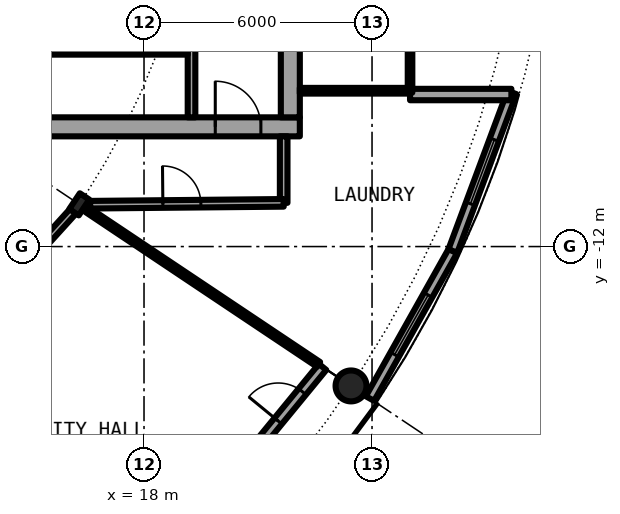
"""IFC4 building model, lengths in metres.
Left out: names, types, materials, properties, quantities, classifications, styles, units other than length and angle.
Written with IfcOpenShell. Run it as: python <this file> out.ifc"""

import sys

from ifc_helpers import new_model, si_unit, direction, frame, frame_2d, origin, origin_2d, place, context, subcontext, project, spatial, rectangle, hollow_circle, i_section, extrude, element, fill, save


model = new_model("IFC4")
c1 = context("Model", 3, precision=1e-05, world=origin(), true_north=direction((0.0, 1.0)))
c2 = subcontext(c1, "Body", "Model", "MODEL_VIEW")
j1 = project(units=[si_unit("LENGTHUNIT", "METRE"), si_unit("PLANEANGLEUNIT", "RADIAN")], contexts=[c1])
p1 = place(None, origin())
s1 = spatial("IfcSite", under=j1, at=p1, CompositionType="ELEMENT")
p2 = place(p1, origin())
s2 = spatial("IfcBuilding", under=s1, at=p2, CompositionType="ELEMENT")
p3 = place(p2, frame((0.0, 0.0, 157.4)))
s3 = spatial("IfcBuildingStorey", under=s2, at=p3, CompositionType="ELEMENT", Elevation=157.4)
p4 = place(p3, frame((23.448, -15.667, 0.0), z_axis=(0.0, 0.0, 1.0), x_axis=(1.0, 0.0, 0.0)))
e1 = element("IfcColumn", 1, at=p4, inside=s3, PredefinedType="COLUMN", context=c2, shape_type="SweptSolid", body=[
    extrude(hollow_circle(Radius=0.406, WallThickness=0.04, at=origin_2d()), origin(), (0.0, 0.0, 1.0), 4.2),
])
p5 = place(p3, frame((16.297, -10.889, 0.0), z_axis=(0.0, 0.0, 1.0), x_axis=(0.831469612303, -0.55557023302, 0.0)))
e2 = element("IfcColumn", 2, at=p5, inside=s3, PredefinedType="COLUMN", context=c2, shape_type="SweptSolid", body=[
    extrude(i_section(OverallWidth=0.3, OverallDepth=0.5, WebThickness=0.014, FlangeThickness=0.028, FilletRadius=0.027, at=origin_2d()), origin(), (0.0, 0.0, 1.0), 4.2),
])
p6 = place(p3, frame((19.304, -19.304, 0.0), z_axis=(0.0, 0.0, 1.0), x_axis=(0.634382322723, 0.773019449054, 0.0)))
e3 = element("IfcWall", 3, at=p6, inside=s3, PredefinedType="SOLIDWALL", context=c2, shape_type="SweptSolid", body=[
    extrude(rectangle(XDim=5.352, YDim=0.25, at=frame_2d((2.676, 0.0))), origin(), (0.0, 0.0, 1.0), 3.85),
])
p7 = place(p6, frame((0.841, 0.0, 0.0)))
e4 = element("IfcOpeningElement", 4, at=p7, cuts=e3, PredefinedType="OPENING", context=c2, shape_type="SweptSolid", body=[
    extrude(rectangle(XDim=1.0, YDim=2.2, at=frame_2d((0.5, 1.1))), frame((0.0, 0.135, 0.0), z_axis=(0.0, -1.0, 0.0), x_axis=(1.0, 0.0, 0.0)), (0.0, 0.0, 1.0), 0.27),
])
p8 = place(p6, frame((3.51, 0.0, 0.0)))
e5 = element("IfcOpeningElement", 5, at=p8, cuts=e3, PredefinedType="OPENING", context=c2, shape_type="SweptSolid", body=[
    extrude(rectangle(XDim=1.0, YDim=2.2, at=frame_2d((0.5, 1.1))), frame((0.0, 0.135, 0.0), z_axis=(0.0, -1.0, 0.0), x_axis=(1.0, 0.0, 0.0)), (0.0, 0.0, 1.0), 0.27),
])
p9 = place(p3, frame((23.946, -16.0, 0.0), z_axis=(0.0, 0.0, 1.0), x_axis=(0.489696356642, 0.871893042919, 0.0)))
e6 = element("IfcWall", 6, at=p9, inside=s3, PredefinedType="SOLIDWALL", context=c2, shape_type="SweptSolid", body=[
    extrude(rectangle(XDim=4.454, YDim=0.25, at=frame_2d((2.227, 0.0))), origin(), (0.0, 0.0, 1.0), 3.85),
])
p10 = place(p9, frame((1.327, 0.0, 0.3)))
e7 = element("IfcOpeningElement", 7, at=p10, cuts=e6, PredefinedType="OPENING", context=c2, shape_type="SweptSolid", body=[
    extrude(rectangle(XDim=1.8, YDim=2.1, at=frame_2d((0.9, 1.05))), frame((0.0, 0.135, 0.0), z_axis=(0.0, -1.0, 0.0), x_axis=(1.0, 0.0, 0.0)), (0.0, 0.0, 1.0), 0.27),
])
p11 = place(p3, frame((26.127, -12.117, 0.0), z_axis=(0.0, 0.0, 1.0), x_axis=(0.349247811493, 0.937030397675, 0.0)))
e8 = element("IfcWall", 8, at=p11, inside=s3, PredefinedType="SOLIDWALL", context=c2, shape_type="SweptSolid", body=[
    extrude(rectangle(XDim=4.452, YDim=0.25, at=frame_2d((2.226, 0.0))), origin(), (0.0, 0.0, 1.0), 3.85),
])
p12 = place(p11, frame((1.327, 0.0, 0.3)))
e9 = element("IfcOpeningElement", 9, at=p12, cuts=e8, PredefinedType="OPENING", context=c2, shape_type="SweptSolid", body=[
    extrude(rectangle(XDim=1.8, YDim=2.1, at=frame_2d((0.9, 1.05))), frame((0.0, 0.135, 0.0), z_axis=(0.0, -1.0, 0.0), x_axis=(1.0, 0.0, 0.0)), (0.0, 0.0, 1.0), 0.27),
])
p13 = place(p3, frame((25.0, -8.0, 0.0), z_axis=(0.0, 0.0, 1.0), x_axis=(1.0, 0.0, 0.0)))
e10 = element("IfcWall", 10, at=p13, inside=s3, PredefinedType="SOLIDWALL", context=c2, shape_type="SweptSolid", body=[
    extrude(rectangle(XDim=2.667, YDim=0.3, at=frame_2d((1.333, 0.0))), origin(), (0.0, 0.0, 1.0), 3.85),
])
p14 = place(p3, frame((8.5, -8.85, 0.0), z_axis=(0.0, 0.0, 1.0), x_axis=(1.0, 0.0, 0.0)))
e11 = element("IfcWall", 11, at=p14, inside=s3, PredefinedType="SHEAR", context=c2, shape_type="SweptSolid", body=[
    extrude(rectangle(XDim=13.6, YDim=0.5, at=frame_2d((6.8, 0.0))), origin(), (0.0, 0.0, 1.0), 4.2),
])
p15 = place(p14, frame((11.375, 0.0, 0.0)))
e12 = element("IfcOpeningElement", 12, at=p15, cuts=e11, PredefinedType="OPENING", context=c2, shape_type="SweptSolid", body=[
    extrude(rectangle(XDim=1.2, YDim=2.3, at=frame_2d((0.6, 1.15))), frame((0.0, 0.26, 0.0), z_axis=(0.0, -1.0, 0.0), x_axis=(1.0, 0.0, 0.0)), (0.0, 0.0, 1.0), 0.52),
])
p16 = place(p3, frame((21.85, 8.6, 0.0), z_axis=(0.0, 0.0, 1.0), x_axis=(0.0, -1.0, 0.0)))
e13 = element("IfcWall", 13, at=p16, inside=s3, PredefinedType="SHEAR", context=c2, shape_type="SweptSolid", body=[
    extrude(rectangle(XDim=17.2, YDim=0.5, at=frame_2d((8.6, 0.0))), origin(), (0.0, 0.0, 1.0), 4.2),
])
p17 = place(p16, frame((7.7, 0.0, 0.0)))
e14 = element("IfcOpeningElement", 14, at=p17, cuts=e13, PredefinedType="OPENING", context=c2, shape_type="SweptSolid", body=[
    extrude(rectangle(XDim=1.8, YDim=2.3, at=frame_2d((0.9, 1.15))), frame((0.0, 0.26, 0.0), z_axis=(0.0, -1.0, 0.0), x_axis=(1.0, 0.0, 0.0)), (0.0, 0.0, 1.0), 0.52),
])
p18 = place(p3, frame((19.25, -8.6, 0.0), z_axis=(0.0, 0.0, 1.0), x_axis=(0.0, 1.0, 0.0)))
e15 = element("IfcWall", 15, at=p18, inside=s3, PredefinedType="SOLIDWALL", context=c2, shape_type="SweptSolid", body=[
    extrude(rectangle(XDim=7.025, YDim=0.2, at=frame_2d((3.513, 0.0))), origin(), (0.0, 0.0, 1.0), 3.85),
])
p19 = place(p18, frame((2.35, 0.0, 0.0)))
e16 = element("IfcOpeningElement", 16, at=p19, cuts=e15, PredefinedType="OPENING", context=c2, shape_type="SweptSolid", body=[
    extrude(rectangle(XDim=1.1, YDim=2.3, at=frame_2d((0.55, 1.15))), frame((0.0, 0.11, 0.0), z_axis=(0.0, -1.0, 0.0), x_axis=(1.0, 0.0, 0.0)), (0.0, 0.0, 1.0), 0.22),
])
p20 = place(p3, frame((15.45, -6.875, 0.0), z_axis=(0.0, 0.0, 1.0), x_axis=(1.0, 0.0, 0.0)))
e17 = element("IfcWall", 17, at=p20, inside=s3, PredefinedType="PARTITIONING", context=c2, shape_type="SweptSolid", body=[
    extrude(rectangle(XDim=3.7, YDim=0.15, at=frame_2d((1.85, 0.0))), origin(), (0.0, 0.0, 1.0), 3.85),
])
p21 = place(p20, frame((1.4, 0.0, 0.0)))
e18 = element("IfcOpeningElement", 18, at=p21, cuts=e17, PredefinedType="OPENING", context=c2, shape_type="SweptSolid", body=[
    extrude(rectangle(XDim=0.9, YDim=2.3, at=frame_2d((0.45, 1.15))), frame((0.0, 0.085, 0.0), z_axis=(0.0, -1.0, 0.0), x_axis=(1.0, 0.0, 0.0)), (0.0, 0.0, 1.0), 0.17),
])
p22 = place(p3, frame((22.1, -7.9, 0.0), z_axis=(0.0, 0.0, 1.0), x_axis=(1.0, 0.0, 0.0)))
e19 = element("IfcWall", 19, at=p22, inside=s3, PredefinedType="PARTITIONING", context=c2, shape_type="SweptSolid", body=[
    extrude(rectangle(XDim=2.84, YDim=0.15, at=frame_2d((1.42, 0.0))), origin(), (0.0, 0.0, 1.0), 3.85),
])
p23 = place(p3, frame((25.0, -7.95, 0.0), z_axis=(0.0, 0.0, 1.0), x_axis=(0.0, 1.0, 0.0)))
e20 = element("IfcWall", 20, at=p23, inside=s3, PredefinedType="PARTITIONING", context=c2, shape_type="SweptSolid", body=[
    extrude(rectangle(XDim=15.9, YDim=0.12, at=frame_2d((7.95, 0.0))), origin(), (0.0, 0.0, 1.0), 3.85),
])
p24 = place(p23, frame((0.95, 0.0, 0.1)))
e21 = element("IfcOpeningElement", 21, at=p24, cuts=e20, PredefinedType="OPENING", context=c2, shape_type="SweptSolid", body=[
    extrude(rectangle(XDim=14.0, YDim=3.5, at=frame_2d((7.0, 1.75))), frame((0.0, 0.07, 0.0), z_axis=(0.0, -1.0, 0.0), x_axis=(1.0, 0.0, 0.0)), (0.0, 0.0, 1.0), 0.14),
])
p25 = place(p3, frame((21.675, -10.85, 0.0), z_axis=(0.0, 0.0, 1.0), x_axis=(0.0, 1.0, 0.0)))
e22 = element("IfcWall", 22, at=p25, inside=s3, PredefinedType="PARTITIONING", context=c2, shape_type="SweptSolid", body=[
    extrude(rectangle(XDim=1.75, YDim=0.2, at=frame_2d((0.875, 0.0))), origin(), (0.0, 0.0, 1.0), 3.85),
])
p26 = place(p3, frame((12.434, -15.151, 0.0), z_axis=(0.0, 0.0, 1.0), x_axis=(0.671532887857, 0.740974750262, 0.0)))
e23 = element("IfcWall", 23, at=p26, inside=s3, PredefinedType="PARTITIONING", context=c2, shape_type="SweptSolid", body=[
    extrude(rectangle(XDim=5.601, YDim=0.2, at=frame_2d((2.8, 0.0))), origin(), (0.0, 0.0, 1.0), 3.54),
])
p27 = place(p3, frame((16.582, -10.899, 0.0), z_axis=(0.0, 0.0, 1.0), x_axis=(0.999954045313, 0.009586827528, 0.0)))
e24 = element("IfcWall", 24, at=p27, inside=s3, PredefinedType="PARTITIONING", context=c2, shape_type="SweptSolid", body=[
    extrude(rectangle(XDim=5.093, YDim=0.2, at=frame_2d((2.547, 0.0))), origin(), (0.0, 0.0, 1.0), 3.85),
])
p28 = place(p27, frame((1.914, 0.0, 0.0)))
e25 = element("IfcOpeningElement", 25, at=p28, cuts=e24, PredefinedType="OPENING", context=c2, shape_type="SweptSolid", body=[
    extrude(rectangle(XDim=1.0, YDim=2.3, at=frame_2d((0.5, 1.15))), frame((0.0, 0.11, 0.0), z_axis=(0.0, -1.0, 0.0), x_axis=(1.0, 0.0, 0.0)), (0.0, 0.0, 1.0), 0.22),
])
p29 = place(p3, frame((16.503, -11.031, 0.0), z_axis=(0.0, 0.0, 1.0), x_axis=(0.831419048668, -0.555645899393, 0.0)))
e26 = element("IfcWall", 26, at=p29, inside=s3, PredefinedType="PARTITIONING", context=c2, shape_type="SweptSolid", body=[
    extrude(rectangle(XDim=7.325, YDim=0.15, at=frame_2d((3.663, 0.0))), origin(), (0.0, 0.0, 1.0), 3.85),
])
p30 = place(p8, origin())
e27 = element("IfcDoor", 27, at=p30, inside=s3, OperationType="SINGLE_SWING_LEFT", PredefinedType="DOOR", context=c2, shape_type="SweptSolid", body=[
    extrude(rectangle(XDim=1.0, YDim=2.2, at=frame_2d((0.5, 1.1))), frame((0.0, 0.025, 0.0), z_axis=(0.0, -1.0, 0.0), x_axis=(1.0, 0.0, 0.0)), (0.0, 0.0, 1.0), 0.05),
])
fill(e5, e27)
p31 = place(p10, origin())
e28 = element("IfcWindow", 28, at=p31, inside=s3, PartitioningType="SINGLE_PANEL", PredefinedType="WINDOW", context=c2, shape_type="SweptSolid", body=[
    extrude(rectangle(XDim=1.8, YDim=2.1, at=frame_2d((0.9, 1.05))), frame((0.0, 0.03, 0.0), z_axis=(0.0, -1.0, 0.0), x_axis=(1.0, 0.0, 0.0)), (0.0, 0.0, 1.0), 0.06),
])
fill(e7, e28)
p32 = place(p12, origin())
e29 = element("IfcWindow", 29, at=p32, inside=s3, PartitioningType="SINGLE_PANEL", PredefinedType="WINDOW", context=c2, shape_type="SweptSolid", body=[
    extrude(rectangle(XDim=1.8, YDim=2.1, at=frame_2d((0.9, 1.05))), frame((0.0, 0.03, 0.0), z_axis=(0.0, -1.0, 0.0), x_axis=(1.0, 0.0, 0.0)), (0.0, 0.0, 1.0), 0.06),
])
fill(e9, e29)
p33 = place(p21, origin())
e30 = element("IfcDoor", 30, at=p33, inside=s3, OperationType="SINGLE_SWING_LEFT", PredefinedType="DOOR", context=c2, shape_type="SweptSolid", body=[
    extrude(rectangle(XDim=0.9, YDim=2.3, at=frame_2d((0.45, 1.15))), frame((0.0, 0.025, 0.0), z_axis=(0.0, -1.0, 0.0), x_axis=(1.0, 0.0, 0.0)), (0.0, 0.0, 1.0), 0.05),
])
fill(e18, e30)
p34 = place(p15, origin())
e31 = element("IfcDoor", 31, at=p34, inside=s3, OperationType="SINGLE_SWING_LEFT", PredefinedType="DOOR", context=c2, shape_type="SweptSolid", body=[
    extrude(rectangle(XDim=1.2, YDim=2.3, at=frame_2d((0.6, 1.15))), frame((0.0, 0.025, 0.0), z_axis=(0.0, -1.0, 0.0), x_axis=(1.0, 0.0, 0.0)), (0.0, 0.0, 1.0), 0.05),
])
fill(e12, e31)
p35 = place(p24, origin())
e32 = element("IfcWindow", 32, at=p35, inside=s3, PartitioningType="SINGLE_PANEL", PredefinedType="WINDOW", context=c2, shape_type="SweptSolid", body=[
    extrude(rectangle(XDim=14.0, YDim=3.5, at=frame_2d((7.0, 1.75))), frame((0.0, 0.03, 0.0), z_axis=(0.0, -1.0, 0.0), x_axis=(1.0, 0.0, 0.0)), (0.0, 0.0, 1.0), 0.06),
])
fill(e21, e32)
p36 = place(p28, origin())
e33 = element("IfcDoor", 33, at=p36, inside=s3, OperationType="SINGLE_SWING_LEFT", PredefinedType="DOOR", context=c2, shape_type="SweptSolid", body=[
    extrude(rectangle(XDim=1.0, YDim=2.3, at=frame_2d((0.5, 1.15))), frame((0.0, 0.025, 0.0), z_axis=(0.0, -1.0, 0.0), x_axis=(1.0, 0.0, 0.0)), (0.0, 0.0, 1.0), 0.05),
])
fill(e25, e33)
save(model, sys.argv[1])
